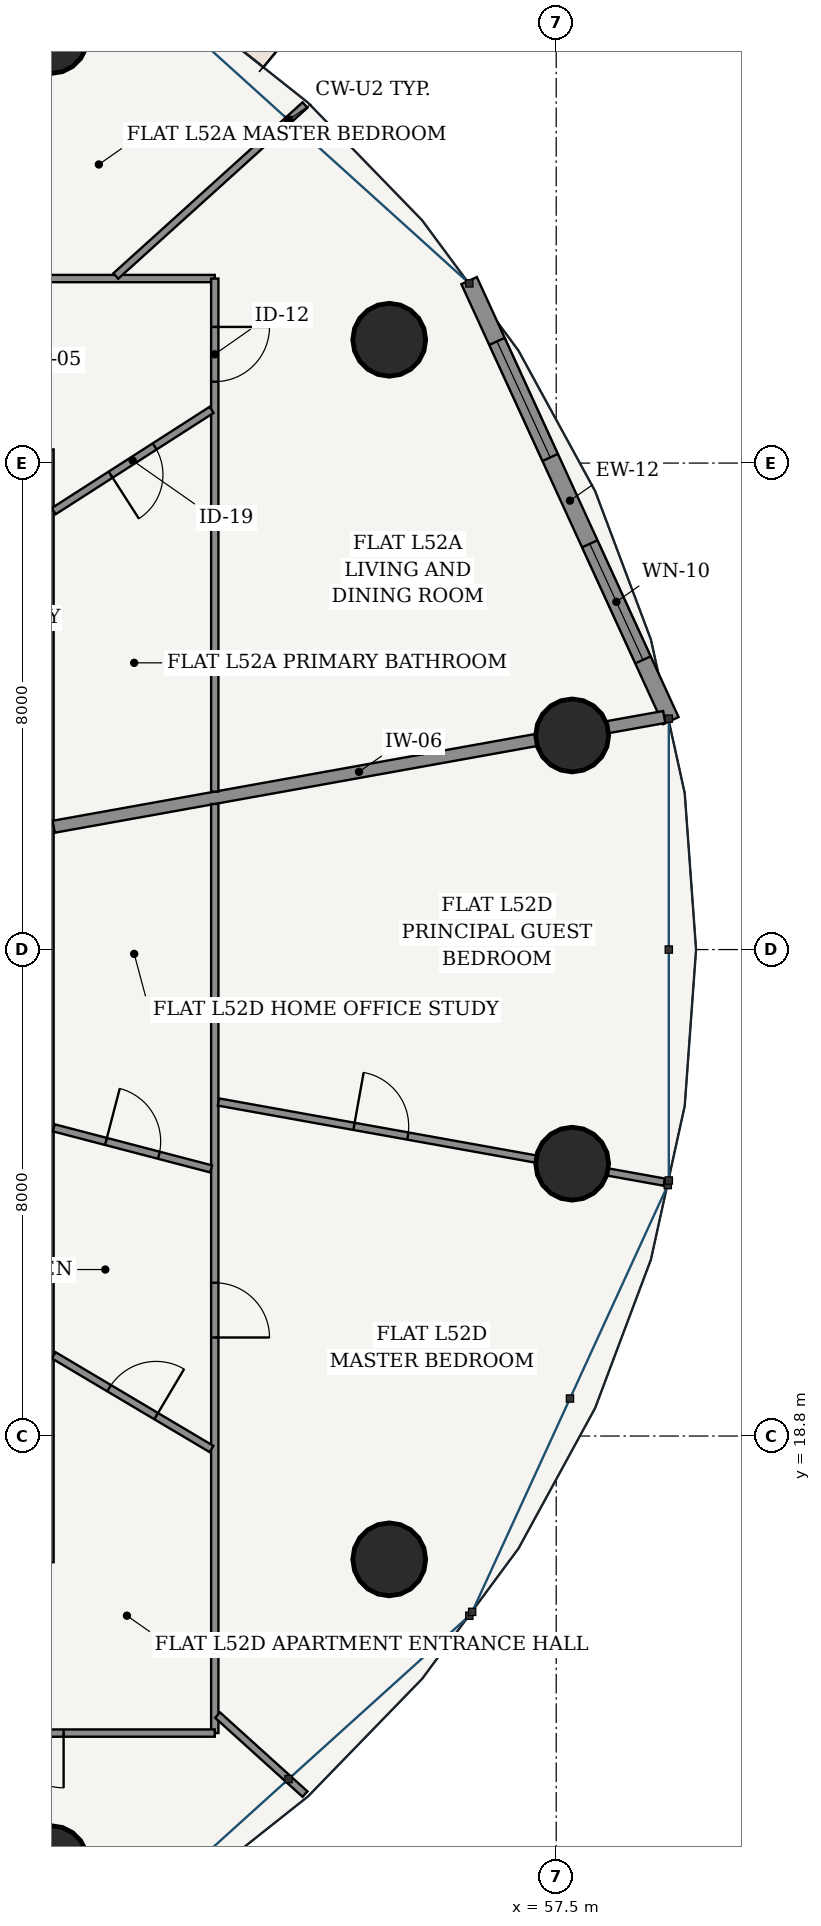
"""IFC4 building model, lengths in metres.
Left out: names, types, materials, properties, quantities, classifications, styles, units other than length and angle.
Written with IfcOpenShell. Run it as: python <this file> out.ifc"""

import sys

from ifc_helpers import new_model, si_unit, direction, frame, frame_2d, origin, origin_2d, place, context, subcontext, project, spatial, rectangle, hollow_circle, extrude, source, transform, mapped, element, fill, save


model = new_model("IFC4")
c1 = context("Model", 3, precision=1e-05, world=origin(), true_north=direction((-0.2419218956, 0.970295726276)))
c2 = subcontext(c1, "Body", "Model", "MODEL_VIEW")
j1 = project(units=[si_unit("LENGTHUNIT", "METRE"), si_unit("PLANEANGLEUNIT", "RADIAN")], contexts=[c1])
p1 = place(None, origin())
s1 = spatial("IfcSite", under=j1, at=p1, CompositionType="ELEMENT")
p2 = place(p1, origin())
s2 = spatial("IfcBuilding", under=s1, at=p2, CompositionType="ELEMENT")
p3 = place(p2, frame((0.0, 0.0, 198.6)))
s3 = spatial("IfcBuildingStorey", under=s2, at=p3, CompositionType="ELEMENT", Elevation=198.6)
for number, where, z_axis, x_axis in (
    (1, (57.763, 30.321, 0.0), (0.0, 0.0, 1.0), (1.0, 0.0, 0.0)),
    (2, (54.754, 36.828, 0.0), (0.0, 0.0, 1.0), (1.0, 0.0, 0.0)),
    (3, (49.195, 41.808, 0.0), (0.0, 0.0, 1.0), (1.0, 0.0, 0.0)),
    (4, (49.195, 11.792, 0.0), (0.0, 0.0, 1.0), (1.0, 0.0, 0.0)),
    (5, (54.754, 16.772, 0.0), (0.0, 0.0, 1.0), (1.0, 0.0, 0.0)),
    (6, (57.763, 23.279, 0.0), (0.0, 0.0, 1.0), (1.0, 0.0, 0.0)),
):
    element("IfcColumn", number, at=place(p3, frame(where, z_axis=z_axis, x_axis=x_axis)), inside=s3, PredefinedType="COLUMN", context=c2, shape_type="SweptSolid", body=[
        extrude(hollow_circle(Radius=0.6, WallThickness=0.038, at=origin_2d()), origin(), (0.0, 0.0, 1.0), 3.7),
    ])
p4 = place(p3, frame((59.385, 30.565, 0.0), z_axis=(0.0, 0.0, 1.0), x_axis=(-0.416717018135, 0.909036262641, 0.0)))
e7 = element("IfcWall", 7, at=p4, inside=s3, PredefinedType="SOLIDWALL", context=c2, shape_type="SweptSolid", body=[
    extrude(rectangle(XDim=7.96, YDim=0.28, at=frame_2d((3.98, 0.0))), origin(), (0.0, 0.0, 1.0), 3.435),
])
p5 = place(p4, frame((1.099, 0.0, 0.85)))
e8 = element("IfcOpeningElement", 8, at=p5, cuts=e7, PredefinedType="OPENING", context=c2, shape_type="SweptSolid", body=[
    extrude(rectangle(XDim=2.1, YDim=1.95, at=frame_2d((1.05, 0.975))), frame((0.0, 0.15, 0.0), z_axis=(0.0, -1.0, 0.0), x_axis=(1.0, 0.0, 0.0)), (0.0, 0.0, 1.0), 0.3),
])
p6 = place(p4, frame((4.761, 0.0, 0.85)))
e9 = element("IfcOpeningElement", 9, at=p6, cuts=e7, PredefinedType="OPENING", context=c2, shape_type="SweptSolid", body=[
    extrude(rectangle(XDim=2.1, YDim=1.95, at=frame_2d((1.05, 0.975))), frame((0.0, 0.15, 0.0), z_axis=(0.0, -1.0, 0.0), x_axis=(1.0, 0.0, 0.0)), (0.0, 0.0, 1.0), 0.3),
])
p7 = place(p3, frame((49.155, 16.725, 0.0), z_axis=(0.0, 0.0, 1.0), x_axis=(0.0, 1.0, 0.0)))
e10 = element("IfcWall", 10, at=p7, inside=s3, PredefinedType="PARTITIONING", context=c2, shape_type="SweptSolid", body=[
    extrude(rectangle(XDim=18.3, YDim=0.16, at=frame_2d((9.15, 0.0))), origin(), (0.0, 0.0, 1.0), 2.951),
])
p8 = place(p3, frame((49.237, 28.82, 0.0), z_axis=(0.0, 0.0, 1.0), x_axis=(0.984224859606, 0.176922089446, 0.0)))
e11 = element("IfcWall", 11, at=p8, inside=s3, PredefinedType="PARTITIONING", context=c2, shape_type="SweptSolid", body=[
    extrude(rectangle(XDim=10.2, YDim=0.2, at=frame_2d((5.1, 0.0))), origin(), (0.0, 0.0, 1.0), 2.951),
])
p9 = place(p3, frame((44.415, 37.835, 0.0), z_axis=(0.0, 0.0, 1.0), x_axis=(1.0, 0.0, 0.0)))
e12 = element("IfcWall", 12, at=p9, inside=s3, PredefinedType="PARTITIONING", context=c2, shape_type="SweptSolid", body=[
    extrude(rectangle(XDim=7.47, YDim=0.12, at=frame_2d((3.735, 0.0))), origin(), (0.0, 0.0, 1.0), 2.951),
])
p10 = place(p9, frame((3.379, 0.0, 0.0)))
e13 = element("IfcOpeningElement", 13, at=p10, cuts=e12, PredefinedType="OPENING", context=c2, shape_type="SweptSolid", body=[
    extrude(rectangle(XDim=0.9, YDim=2.15, at=frame_2d((0.45, 1.075))), frame((0.0, 0.07, 0.0), z_axis=(0.0, -1.0, 0.0), x_axis=(1.0, 0.0, 0.0)), (0.0, 0.0, 1.0), 0.14),
])
p11 = place(p3, frame((51.885, 37.835, 0.0), z_axis=(0.0, 0.0, 1.0), x_axis=(0.0, -1.0, 0.0)))
e14 = element("IfcWall", 14, at=p11, inside=s3, PredefinedType="PARTITIONING", context=c2, shape_type="SweptSolid", body=[
    extrude(rectangle(XDim=8.437, YDim=0.12, at=frame_2d((4.219, 0.0))), origin(), (0.0, 0.0, 1.0), 2.951),
])
p12 = place(p11, frame((0.796, 0.0, 0.0)))
e15 = element("IfcOpeningElement", 15, at=p12, cuts=e14, PredefinedType="OPENING", context=c2, shape_type="SweptSolid", body=[
    extrude(rectangle(XDim=0.9, YDim=2.15, at=frame_2d((0.45, 1.075))), frame((0.0, 0.07, 0.0), z_axis=(0.0, -1.0, 0.0), x_axis=(1.0, 0.0, 0.0)), (0.0, 0.0, 1.0), 0.14),
])
p13 = place(p3, frame((50.257, 37.876, 0.0), z_axis=(0.0, 0.0, 1.0), x_axis=(0.741943837234, 0.670462036502, 0.0)))
e16 = element("IfcWall", 16, at=p13, inside=s3, PredefinedType="PARTITIONING", context=c2, shape_type="SweptSolid", body=[
    extrude(rectangle(XDim=4.194, YDim=0.12, at=frame_2d((2.097, 0.0))), origin(), (0.0, 0.0, 1.0), 2.951),
])
p14 = place(p3, frame((46.196, 37.885, 0.0), z_axis=(0.0, 0.0, 1.0), x_axis=(0.594507557292, 0.804090022524, 0.0)))
e17 = element("IfcWall", 17, at=p14, inside=s3, PredefinedType="PARTITIONING", context=c2, shape_type="SweptSolid", body=[
    extrude(rectangle(XDim=6.481, YDim=0.12, at=frame_2d((3.241, 0.0))), origin(), (0.0, 0.0, 1.0), 2.951),
])
p15 = place(p3, frame((49.237, 34.009, 0.0), z_axis=(0.0, 0.0, 1.0), x_axis=(0.841651322174, 0.540021343915, 0.0)))
e18 = element("IfcWall", 18, at=p15, inside=s3, PredefinedType="PARTITIONING", context=c2, shape_type="SweptSolid", body=[
    extrude(rectangle(XDim=3.085, YDim=0.12, at=frame_2d((1.542, 0.0))), origin(), (0.0, 0.0, 1.0), 3.11),
])
p16 = place(p15, frame((1.112, 0.0, 0.0)))
e19 = element("IfcOpeningElement", 19, at=p16, cuts=e18, PredefinedType="OPENING", context=c2, shape_type="SweptSolid", body=[
    extrude(rectangle(XDim=0.86, YDim=2.15, at=frame_2d((0.43, 1.075))), frame((0.0, 0.07, 0.0), z_axis=(0.0, -1.0, 0.0), x_axis=(1.0, 0.0, 0.0)), (0.0, 0.0, 1.0), 0.14),
])
p17 = place(p3, frame((51.885, 29.194, 0.0), z_axis=(0.0, 0.0, 1.0), x_axis=(0.0, -1.0, 0.0)))
e20 = element("IfcWall", 20, at=p17, inside=s3, PredefinedType="PARTITIONING", context=c2, shape_type="SweptSolid", body=[
    extrude(rectangle(XDim=15.279, YDim=0.12, at=frame_2d((7.639, 0.0))), origin(), (0.0, 0.0, 1.0), 2.951),
])
p18 = place(p17, frame((7.873, 0.0, 0.0)))
e21 = element("IfcOpeningElement", 21, at=p18, cuts=e20, PredefinedType="OPENING", context=c2, shape_type="SweptSolid", body=[
    extrude(rectangle(XDim=0.9, YDim=2.15, at=frame_2d((0.45, 1.075))), frame((0.0, 0.07, 0.0), z_axis=(0.0, -1.0, 0.0), x_axis=(1.0, 0.0, 0.0)), (0.0, 0.0, 1.0), 0.14),
])
p19 = place(p3, frame((51.885, 13.915, 0.0), z_axis=(0.0, 0.0, 1.0), x_axis=(-1.0, 0.0, 0.0)))
e22 = element("IfcWall", 22, at=p19, inside=s3, PredefinedType="PARTITIONING", context=c2, shape_type="SweptSolid", body=[
    extrude(rectangle(XDim=10.947, YDim=0.12, at=frame_2d((5.473, 0.0))), origin(), (0.0, 0.0, 1.0), 2.951),
])
p20 = place(p19, frame((2.486, 0.0, 0.0)))
e23 = element("IfcOpeningElement", 23, at=p20, cuts=e22, PredefinedType="OPENING", context=c2, shape_type="SweptSolid", body=[
    extrude(rectangle(XDim=0.9, YDim=2.15, at=frame_2d((0.45, 1.075))), frame((0.0, 0.07, 0.0), z_axis=(0.0, -1.0, 0.0), x_axis=(1.0, 0.0, 0.0)), (0.0, 0.0, 1.0), 0.14),
])
p21 = place(p3, frame((51.931, 14.211, 0.0), z_axis=(0.0, 0.0, 1.0), x_axis=(0.741971265209, -0.670431683026, 0.0)))
e24 = element("IfcWall", 24, at=p21, inside=s3, PredefinedType="PARTITIONING", context=c2, shape_type="SweptSolid", body=[
    extrude(rectangle(XDim=1.938, YDim=0.12, at=frame_2d((0.969, 0.0))), origin(), (0.0, 0.0, 1.0), 2.951),
])
p22 = place(p3, frame((51.946, 24.293, 0.0), z_axis=(0.0, 0.0, 1.0), x_axis=(0.984227185588, -0.176909149424, 0.0)))
e25 = element("IfcWall", 25, at=p22, inside=s3, PredefinedType="PARTITIONING", context=c2, shape_type="SweptSolid", body=[
    extrude(rectangle(XDim=7.448, YDim=0.12, at=frame_2d((3.724, 0.0))), origin(), (0.0, 0.0, 1.0), 2.951),
])
p23 = place(p22, frame((2.264, 0.0, 0.0)))
e26 = element("IfcOpeningElement", 26, at=p23, cuts=e25, PredefinedType="OPENING", context=c2, shape_type="SweptSolid", body=[
    extrude(rectangle(XDim=0.9, YDim=2.15, at=frame_2d((0.45, 1.075))), frame((0.0, 0.07, 0.0), z_axis=(0.0, -1.0, 0.0), x_axis=(1.0, 0.0, 0.0)), (0.0, 0.0, 1.0), 0.14),
])
p24 = place(p3, frame((49.237, 20.128, 0.0), z_axis=(0.0, 0.0, 1.0), x_axis=(0.859818120481, -0.510600430565, 0.0)))
e27 = element("IfcWall", 27, at=p24, inside=s3, PredefinedType="PARTITIONING", context=c2, shape_type="SweptSolid", body=[
    extrude(rectangle(XDim=3.018, YDim=0.12, at=frame_2d((1.509, 0.0))), origin(), (0.0, 0.0, 1.0), 2.951),
])
p25 = place(p24, frame((1.059, 0.0, 0.0)))
e28 = element("IfcOpeningElement", 28, at=p25, cuts=e27, PredefinedType="OPENING", context=c2, shape_type="SweptSolid", body=[
    extrude(rectangle(XDim=0.9, YDim=2.15, at=frame_2d((0.45, 1.075))), frame((0.0, 0.07, 0.0), z_axis=(0.0, -1.0, 0.0), x_axis=(1.0, 0.0, 0.0)), (0.0, 0.0, 1.0), 0.14),
])
p26 = place(p3, frame((49.237, 23.868, 0.0), z_axis=(0.0, 0.0, 1.0), x_axis=(0.967622119215, -0.252403316946, 0.0)))
e29 = element("IfcWall", 29, at=p26, inside=s3, PredefinedType="PARTITIONING", context=c2, shape_type="SweptSolid", body=[
    extrude(rectangle(XDim=2.675, YDim=0.12, at=frame_2d((1.337, 0.0))), origin(), (0.0, 0.0, 1.0), 3.435),
])
p27 = place(p26, frame((0.887, 0.0, 0.0)))
e30 = element("IfcOpeningElement", 30, at=p27, cuts=e29, PredefinedType="OPENING", context=c2, shape_type="SweptSolid", body=[
    extrude(rectangle(XDim=0.9, YDim=2.15, at=frame_2d((0.45, 1.075))), frame((0.0, 0.07, 0.0), z_axis=(0.0, -1.0, 0.0), x_axis=(1.0, 0.0, 0.0)), (0.0, 0.0, 1.0), 0.14),
])
m1 = source(origin(), c2, "Body", "SweptSolid", [
    extrude(rectangle(XDim=2.1, YDim=1.95, at=frame_2d((1.05, 0.975))), frame((0.0, 0.03, 0.0), z_axis=(0.0, -1.0, 0.0), x_axis=(1.0, 0.0, 0.0)), (0.0, 0.0, 1.0), 0.06),
])
p28 = place(p5, origin())
e31 = element("IfcWindow", 31, at=p28, inside=s3, PartitioningType="SINGLE_PANEL", PredefinedType="WINDOW", context=c2, shape_type="MappedRepresentation", body=[
    mapped(m1, transform((0.0, 0.0, 0.0), scale=1.0)),
])
fill(e8, e31)
p29 = place(p6, origin())
e32 = element("IfcWindow", 32, at=p29, inside=s3, PartitioningType="SINGLE_PANEL", PredefinedType="WINDOW", context=c2, shape_type="MappedRepresentation", body=[
    mapped(m1, transform((0.0, 0.0, 0.0), scale=1.0)),
])
fill(e9, e32)
m2 = source(origin(), c2, "Body", "SweptSolid", [
    extrude(rectangle(XDim=0.86, YDim=2.15, at=frame_2d((0.43, 1.075))), frame((0.0, 0.025, 0.0), z_axis=(0.0, -1.0, 0.0), x_axis=(1.0, 0.0, 0.0)), (0.0, 0.0, 1.0), 0.05),
])
p30 = place(p16, frame((0.86, 0.0, 0.0), z_axis=(0.0, 0.0, 1.0), x_axis=(-1.0, 0.0, 0.0)))
e33 = element("IfcDoor", 33, at=p30, inside=s3, OperationType="SINGLE_SWING_RIGHT", PredefinedType="DOOR", context=c2, shape_type="MappedRepresentation", body=[
    mapped(m2, transform((0.0, 0.0, 0.0), scale=1.0)),
])
fill(e19, e33)
m3 = source(origin(), c2, "Body", "SweptSolid", [
    extrude(rectangle(XDim=0.9, YDim=2.15, at=frame_2d((0.45, 1.075))), frame((0.0, 0.025, 0.0), z_axis=(0.0, -1.0, 0.0), x_axis=(1.0, 0.0, 0.0)), (0.0, 0.0, 1.0), 0.05),
])
p31 = place(p12, origin())
e34 = element("IfcDoor", 34, at=p31, inside=s3, OperationType="SINGLE_SWING_LEFT", PredefinedType="DOOR", context=c2, shape_type="MappedRepresentation", body=[
    mapped(m3, transform((0.0, 0.0, 0.0), scale=1.0)),
])
fill(e15, e34)
p32 = place(p20, origin())
e35 = element("IfcDoor", 35, at=p32, inside=s3, OperationType="SINGLE_SWING_LEFT", PredefinedType="DOOR", context=c2, shape_type="MappedRepresentation", body=[
    mapped(m3, transform((0.0, 0.0, 0.0), scale=1.0)),
])
fill(e23, e35)
p33 = place(p25, origin())
e36 = element("IfcDoor", 36, at=p33, inside=s3, OperationType="SINGLE_SWING_RIGHT", PredefinedType="DOOR", context=c2, shape_type="MappedRepresentation", body=[
    mapped(m3, transform((0.0, 0.0, 0.0), scale=1.0)),
])
fill(e28, e36)
p34 = place(p27, origin())
e37 = element("IfcDoor", 37, at=p34, inside=s3, OperationType="SINGLE_SWING_LEFT", PredefinedType="DOOR", context=c2, shape_type="MappedRepresentation", body=[
    mapped(m3, transform((0.0, 0.0, 0.0), scale=1.0)),
])
fill(e30, e37)
p35 = place(p18, origin())
e38 = element("IfcDoor", 38, at=p35, inside=s3, OperationType="SINGLE_SWING_RIGHT", PredefinedType="DOOR", context=c2, shape_type="MappedRepresentation", body=[
    mapped(m3, transform((0.0, 0.0, 0.0), scale=1.0)),
])
fill(e21, e38)
p36 = place(p23, origin())
e39 = element("IfcDoor", 39, at=p36, inside=s3, OperationType="SINGLE_SWING_LEFT", PredefinedType="DOOR", context=c2, shape_type="MappedRepresentation", body=[
    mapped(m3, transform((0.0, 0.0, 0.0), scale=1.0)),
])
fill(e26, e39)
save(model, sys.argv[1])
